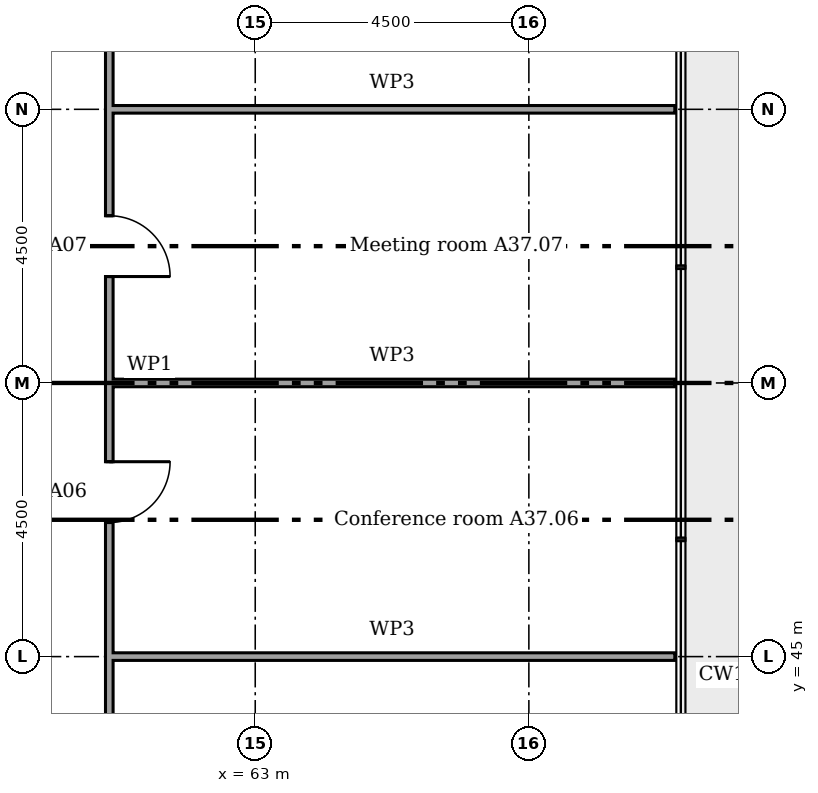
"""IFC4 building model, lengths in metres.
Left out: names, types, materials, properties, quantities, classifications, styles, units other than length and angle.
Written with IfcOpenShell. Run it as: python <this file> out.ifc"""

import sys

from ifc_helpers import new_model, si_unit, direction, frame, frame_2d, origin, place, context, subcontext, project, spatial, rectangle, extrude, element, fill, save


model = new_model("IFC4")
c1 = context("Model", 3, precision=1e-05, world=origin(), true_north=direction((0.0, 1.0)))
c2 = subcontext(c1, "Body", "Model", "MODEL_VIEW")
j1 = project(units=[si_unit("LENGTHUNIT", "METRE"), si_unit("PLANEANGLEUNIT", "RADIAN")], contexts=[c1])
p1 = place(None, origin())
s1 = spatial("IfcSite", under=j1, at=p1, CompositionType="ELEMENT")
p2 = place(p1, origin())
s2 = spatial("IfcBuilding", under=s1, at=p2, CompositionType="ELEMENT")
p3 = place(p2, frame((0.0, 0.0, 151.0)))
s3 = spatial("IfcBuildingStorey", under=s2, at=p3, CompositionType="ELEMENT", Elevation=151.0)
for number, where in (
    (1, (60.6, 45.0, 0.0)),
    (2, (60.6, 49.5, 0.0)),
    (3, (60.6, 54.0, 0.0)),
):
    element("IfcWall", number, at=place(p3, frame(where)), inside=s3, PredefinedType="MOVABLE", context=c2, shape_type="SweptSolid", body=[
        extrude(rectangle(XDim=9.3, YDim=0.125, at=frame_2d((4.65, 0.0))), origin(), (0.0, 0.0, 1.0), 2.766),
    ])
p4 = place(p3, frame((60.6, 38.762, 0.0), z_axis=(0.0, 0.0, 1.0), x_axis=(0.0, 1.0, 0.0)))
e4 = element("IfcWall", 4, at=p4, inside=s3, PredefinedType="PARTITIONING", context=c2, shape_type="SweptSolid", body=[
    extrude(rectangle(XDim=22.075, YDim=0.125, at=frame_2d((11.038, 0.0))), origin(), (0.0, 0.0, 1.0), 3.45),
])
p5 = place(p4, frame((3.032, 0.0, 0.0)))
e5 = element("IfcOpeningElement", 5, at=p5, cuts=e4, PredefinedType="OPENING", context=c2, shape_type="SweptSolid", body=[
    extrude(rectangle(XDim=1.0, YDim=2.1, at=frame_2d((0.5, 1.05))), frame((0.0, 0.073, 0.0), z_axis=(0.0, -1.0, 0.0), x_axis=(1.0, 0.0, 0.0)), (0.0, 0.0, 1.0), 0.145),
])
p6 = place(p4, frame((8.442, 0.0, 0.0)))
e6 = element("IfcOpeningElement", 6, at=p6, cuts=e4, PredefinedType="OPENING", context=c2, shape_type="SweptSolid", body=[
    extrude(rectangle(XDim=1.0, YDim=2.1, at=frame_2d((0.5, 1.05))), frame((0.0, 0.073, 0.0), z_axis=(0.0, -1.0, 0.0), x_axis=(1.0, 0.0, 0.0)), (0.0, 0.0, 1.0), 0.145),
])
p7 = place(p4, frame((12.488, 0.0, 0.0)))
e7 = element("IfcOpeningElement", 7, at=p7, cuts=e4, PredefinedType="OPENING", context=c2, shape_type="SweptSolid", body=[
    extrude(rectangle(XDim=1.0, YDim=2.1, at=frame_2d((0.5, 1.05))), frame((0.0, 0.073, 0.0), z_axis=(0.0, -1.0, 0.0), x_axis=(1.0, 0.0, 0.0)), (0.0, 0.0, 1.0), 0.145),
])
p8 = place(p4, frame((16.532, 0.0, 0.0)))
e8 = element("IfcOpeningElement", 8, at=p8, cuts=e4, PredefinedType="OPENING", context=c2, shape_type="SweptSolid", body=[
    extrude(rectangle(XDim=1.0, YDim=2.1, at=frame_2d((0.5, 1.05))), frame((0.0, 0.073, 0.0), z_axis=(0.0, -1.0, 0.0), x_axis=(1.0, 0.0, 0.0)), (0.0, 0.0, 1.0), 0.145),
])
p9 = place(p4, frame((20.663, 0.0, 0.0)))
e9 = element("IfcOpeningElement", 9, at=p9, cuts=e4, PredefinedType="OPENING", context=c2, shape_type="SweptSolid", body=[
    extrude(rectangle(XDim=0.9, YDim=2.1, at=frame_2d((0.45, 1.05))), frame((0.0, 0.073, 0.0), z_axis=(0.0, -1.0, 0.0), x_axis=(1.0, 0.0, 0.0)), (0.0, 0.0, 1.0), 0.145),
])
p10 = place(p6, frame((1.0, 0.0, 0.0), x_axis=(-1.0, 0.0, 0.0)))
e10 = element("IfcDoor", 10, at=p10, inside=s3, OperationType="SINGLE_SWING_RIGHT", PredefinedType="DOOR", context=c2, shape_type="SweptSolid", body=[
    extrude(rectangle(XDim=1.0, YDim=2.1, at=frame_2d((0.5, 1.05))), frame((0.0, 0.025, 0.0), z_axis=(0.0, -1.0, 0.0), x_axis=(1.0, 0.0, 0.0)), (0.0, 0.0, 1.0), 0.05),
])
fill(e6, e10)
p11 = place(p7, frame((1.0, 0.0, 0.0), x_axis=(-1.0, 0.0, 0.0)))
e11 = element("IfcDoor", 11, at=p11, inside=s3, OperationType="SINGLE_SWING_LEFT", PredefinedType="DOOR", context=c2, shape_type="SweptSolid", body=[
    extrude(rectangle(XDim=1.0, YDim=2.1, at=frame_2d((0.5, 1.05))), frame((0.0, 0.025, 0.0), z_axis=(0.0, -1.0, 0.0), x_axis=(1.0, 0.0, 0.0)), (0.0, 0.0, 1.0), 0.05),
])
fill(e7, e11)
save(model, sys.argv[1])
